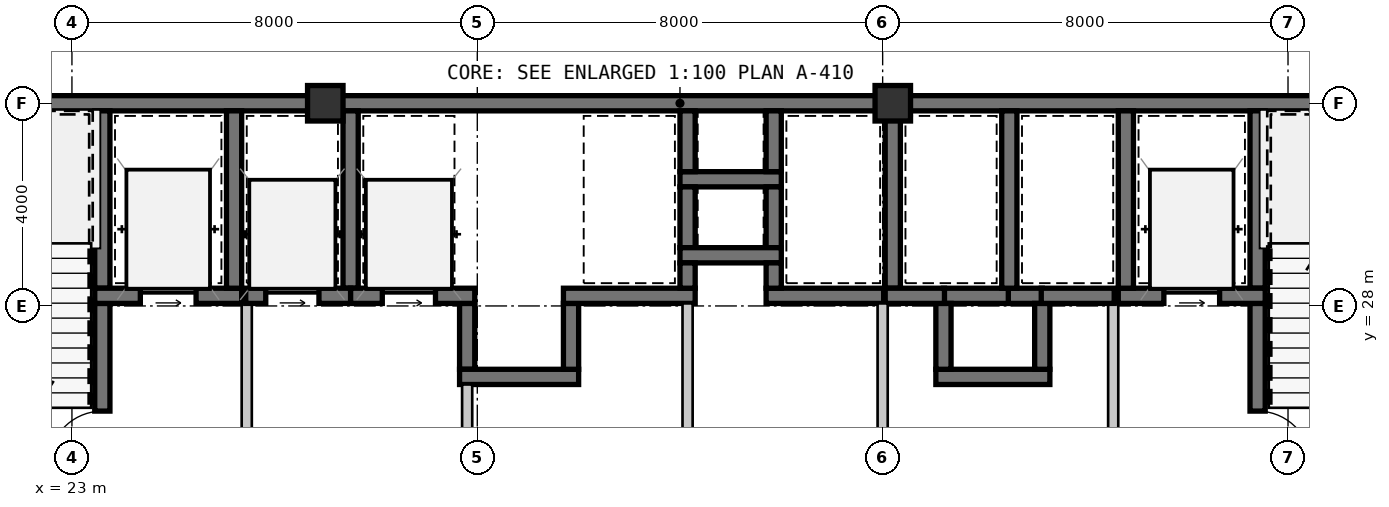
"""IFC4 building model, lengths in metres.
Left out: names, types, materials, properties, quantities, classifications, styles, units other than length and angle.
Written with IfcOpenShell. Run it as: python <this file> out.ifc"""

import sys

from ifc_helpers import new_model, si_unit, direction, frame, frame_2d, origin, origin_2d, place, context, subcontext, project, spatial, rectangle, extrude, source, transform, mapped, element, fill, save


model = new_model("IFC4")
c1 = context("Model", 3, precision=1e-05, world=origin(), true_north=direction((0.0, 1.0)))
c2 = subcontext(c1, "Body", "Model", "MODEL_VIEW")
j1 = project(units=[si_unit("LENGTHUNIT", "METRE"), si_unit("PLANEANGLEUNIT", "RADIAN")], contexts=[c1])
p1 = place(None, origin())
s1 = spatial("IfcSite", under=j1, at=p1, CompositionType="ELEMENT")
p2 = place(p1, origin())
s2 = spatial("IfcBuilding", under=s1, at=p2, CompositionType="ELEMENT")
p3 = place(p2, frame((0.0, 0.0, 74.55)))
s3 = spatial("IfcBuildingStorey", under=s2, at=p3, CompositionType="ELEMENT", Elevation=74.55)
m1 = source(origin(), c2, "Body", "SweptSolid", [
    extrude(rectangle(XDim=0.7, YDim=0.7, at=origin_2d()), origin(), (0.0, 0.0, 1.0), 3.15),
])
for number, where, z_axis, x_axis in (
    (1, (28.0, 32.0, 0.0), (0.0, 0.0, 1.0), (1.0, 0.0, 0.0)),
    (2, (39.2, 32.0, 0.0), (0.0, 0.0, 1.0), (1.0, 0.0, 0.0)),
):
    element("IfcColumn", number, at=place(p3, frame(where, z_axis=z_axis, x_axis=x_axis)), inside=s3, PredefinedType="COLUMN", context=c2, shape_type="MappedRepresentation", body=[
        mapped(m1, transform((0.0, 0.0, 0.0), scale=1.0)),
    ])
m2 = source(origin(), c2, "Body", "SweptSolid", [
    extrude(rectangle(XDim=9.15, YDim=0.3, at=frame_2d((4.575, 0.0))), origin(), (0.0, 0.0, 1.0), 2.93),
])
p4 = place(p3, frame((18.85, 32.0, 0.0), z_axis=(0.0, 0.0, 1.0), x_axis=(1.0, 0.0, 0.0)))
e3 = element("IfcWall", 3, at=p4, inside=s3, PredefinedType="SHEAR", context=c2, shape_type="MappedRepresentation", body=[
    mapped(m2, transform((0.0, 0.0, 0.0), scale=1.0)),
])
m3 = source(origin(), c2, "Body", "SweptSolid", [
    extrude(rectangle(XDim=11.2, YDim=0.3, at=frame_2d((5.6, 0.0))), origin(), (0.0, 0.0, 1.0), 2.93),
])
p5 = place(p3, frame((28.0, 32.0, 0.0), z_axis=(0.0, 0.0, 1.0), x_axis=(1.0, 0.0, 0.0)))
e4 = element("IfcWall", 4, at=p5, inside=s3, PredefinedType="SHEAR", context=c2, shape_type="MappedRepresentation", body=[
    mapped(m3, transform((0.0, 0.0, 0.0), scale=1.0)),
])
m4 = source(origin(), c2, "Body", "SweptSolid", [
    extrude(rectangle(XDim=11.95, YDim=0.3, at=frame_2d((5.975, 0.0))), origin(), (0.0, 0.0, 1.0), 2.93),
])
p6 = place(p3, frame((39.2, 32.0, 0.0), z_axis=(0.0, 0.0, 1.0), x_axis=(1.0, 0.0, 0.0)))
e5 = element("IfcWall", 5, at=p6, inside=s3, PredefinedType="SHEAR", context=c2, shape_type="MappedRepresentation", body=[
    mapped(m4, transform((0.0, 0.0, 0.0), scale=1.0)),
])
m5 = source(origin(), c2, "Body", "SweptSolid", [
    extrude(rectangle(XDim=3.5, YDim=0.3, at=frame_2d((1.75, 0.0))), origin(), (0.0, 0.0, 1.0), 2.93),
])
p7 = place(p3, frame((23.6, 28.35, 0.0), z_axis=(0.0, 0.0, 1.0), x_axis=(0.0, 1.0, 0.0)))
e6 = element("IfcWall", 6, at=p7, inside=s3, PredefinedType="SHEAR", context=c2, shape_type="MappedRepresentation", body=[
    mapped(m5, transform((0.0, 0.0, 0.0), scale=1.0)),
])
m6 = source(origin(), c2, "Body", "SweptSolid", [
    extrude(rectangle(XDim=3.9, YDim=0.3, at=frame_2d((1.95, 0.0))), origin(), (0.0, 0.0, 1.0), 2.93),
])
p8 = place(p3, frame((23.6, 24.15, 0.0), z_axis=(0.0, 0.0, 1.0), x_axis=(0.0, 1.0, 0.0)))
e7 = element("IfcWall", 7, at=p8, inside=s3, PredefinedType="SHEAR", context=c2, shape_type="MappedRepresentation", body=[
    mapped(m6, transform((0.0, 0.0, 0.0), scale=1.0)),
])
m7 = source(origin(), c2, "Body", "SweptSolid", [
    extrude(rectangle(XDim=1.05, YDim=2.1, at=frame_2d((0.525, 1.05))), frame((0.0, 0.16, 0.0), z_axis=(0.0, -1.0, 0.0), x_axis=(1.0, 0.0, 0.0)), (0.0, 0.0, 1.0), 0.32),
])
p9 = place(p8, frame((0.725, 0.0, 0.0)))
e8 = element("IfcOpeningElement", 8, at=p9, cuts=e7, PredefinedType="OPENING", context=c2, shape_type="MappedRepresentation", body=[
    mapped(m7, transform((0.0, 0.0, 0.0), scale=1.0)),
])
m8 = source(origin(), c2, "Body", "SweptSolid", [
    extrude(rectangle(XDim=2.9, YDim=0.3, at=frame_2d((1.45, 0.0))), origin(), (0.0, 0.0, 1.0), 2.93),
])
p10 = place(p3, frame((23.45, 28.2, 0.0), z_axis=(0.0, 0.0, 1.0), x_axis=(1.0, 0.0, 0.0)))
e9 = element("IfcWall", 9, at=p10, inside=s3, PredefinedType="SHEAR", context=c2, shape_type="MappedRepresentation", body=[
    mapped(m8, transform((0.0, 0.0, 0.0), scale=1.0)),
])
m9 = source(origin(), c2, "Body", "SweptSolid", [
    extrude(rectangle(XDim=1.1, YDim=2.15, at=frame_2d((0.55, 1.075))), frame((0.0, 0.16, 0.0), z_axis=(0.0, -1.0, 0.0), x_axis=(1.0, 0.0, 0.0)), (0.0, 0.0, 1.0), 0.32),
])
p11 = place(p10, frame((0.9, 0.0, 0.0)))
e10 = element("IfcOpeningElement", 10, at=p11, cuts=e9, PredefinedType="OPENING", context=c2, shape_type="MappedRepresentation", body=[
    mapped(m9, transform((0.0, 0.0, 0.0), scale=1.0)),
])
p12 = place(p3, frame((26.2, 28.35, 0.0), z_axis=(0.0, 0.0, 1.0), x_axis=(0.0, 1.0, 0.0)))
e11 = element("IfcWall", 11, at=p12, inside=s3, PredefinedType="SHEAR", context=c2, shape_type="MappedRepresentation", body=[
    mapped(m5, transform((0.0, 0.0, 0.0), scale=1.0)),
])
m10 = source(origin(), c2, "Body", "SweptSolid", [
    extrude(rectangle(XDim=3.95, YDim=0.2, at=frame_2d((1.975, 0.0))), origin(), (0.0, 0.0, 1.0), 2.93),
])
p13 = place(p3, frame((26.45, 24.1, 0.0), z_axis=(0.0, 0.0, 1.0), x_axis=(0.0, 1.0, 0.0)))
e12 = element("IfcWall", 12, at=p13, inside=s3, PredefinedType="SOLIDWALL", context=c2, shape_type="MappedRepresentation", body=[
    mapped(m10, transform((0.0, 0.0, 0.0), scale=1.0)),
])
p14 = place(p3, frame((46.4, 31.85, 0.0), z_axis=(0.0, 0.0, 1.0), x_axis=(0.0, -1.0, 0.0)))
e13 = element("IfcWall", 13, at=p14, inside=s3, PredefinedType="SHEAR", context=c2, shape_type="MappedRepresentation", body=[
    mapped(m5, transform((0.0, 0.0, 0.0), scale=1.0)),
])
p15 = place(p3, frame((46.4, 28.05, 0.0), z_axis=(0.0, 0.0, 1.0), x_axis=(0.0, -1.0, 0.0)))
e14 = element("IfcWall", 14, at=p15, inside=s3, PredefinedType="SHEAR", context=c2, shape_type="MappedRepresentation", body=[
    mapped(m6, transform((0.0, 0.0, 0.0), scale=1.0)),
])
p16 = place(p15, frame((2.125, 0.0, 0.0)))
e15 = element("IfcOpeningElement", 15, at=p16, cuts=e14, PredefinedType="OPENING", context=c2, shape_type="MappedRepresentation", body=[
    mapped(m7, transform((0.0, 0.0, 0.0), scale=1.0)),
])
p17 = place(p3, frame((43.65, 28.2, 0.0), z_axis=(0.0, 0.0, 1.0), x_axis=(1.0, 0.0, 0.0)))
e16 = element("IfcWall", 16, at=p17, inside=s3, PredefinedType="SHEAR", context=c2, shape_type="MappedRepresentation", body=[
    mapped(m8, transform((0.0, 0.0, 0.0), scale=1.0)),
])
p18 = place(p17, frame((0.9, 0.0, 0.0)))
e17 = element("IfcOpeningElement", 17, at=p18, cuts=e16, PredefinedType="OPENING", context=c2, shape_type="MappedRepresentation", body=[
    mapped(m9, transform((0.0, 0.0, 0.0), scale=1.0)),
])
p19 = place(p3, frame((43.8, 31.85, 0.0), z_axis=(0.0, 0.0, 1.0), x_axis=(0.0, -1.0, 0.0)))
e18 = element("IfcWall", 18, at=p19, inside=s3, PredefinedType="SHEAR", context=c2, shape_type="MappedRepresentation", body=[
    mapped(m5, transform((0.0, 0.0, 0.0), scale=1.0)),
])
p20 = place(p3, frame((43.55, 28.05, 0.0), z_axis=(0.0, 0.0, 1.0), x_axis=(0.0, -1.0, 0.0)))
e19 = element("IfcWall", 19, at=p20, inside=s3, PredefinedType="SOLIDWALL", context=c2, shape_type="MappedRepresentation", body=[
    mapped(m10, transform((0.0, 0.0, 0.0), scale=1.0)),
])
m11 = source(origin(), c2, "Body", "SweptSolid", [
    extrude(rectangle(XDim=2.0, YDim=0.3, at=frame_2d((1.0, 0.0))), origin(), (0.0, 0.0, 1.0), 2.93),
])
p21 = place(p3, frame((35.0, 30.5, 0.0), z_axis=(0.0, 0.0, 1.0), x_axis=(1.0, 0.0, 0.0)))
e20 = element("IfcWall", 20, at=p21, inside=s3, PredefinedType="SHEAR", context=c2, shape_type="MappedRepresentation", body=[
    mapped(m11, transform((0.0, 0.0, 0.0), scale=1.0)),
])
m12 = source(origin(), c2, "Body", "SweptSolid", [
    extrude(rectangle(XDim=1.2, YDim=0.3, at=frame_2d((0.6, 0.0))), origin(), (0.0, 0.0, 1.0), 2.93),
])
for number, where, z_axis, x_axis in (
    (21, (35.15, 31.85, 0.0), (0.0, 0.0, 1.0), (0.0, -1.0, 0.0)),
    (22, (36.85, 30.65, 0.0), (0.0, 0.0, 1.0), (0.0, 1.0, 0.0)),
    (23, (35.15, 30.35, 0.0), (0.0, 0.0, 1.0), (0.0, -1.0, 0.0)),
    (24, (36.85, 29.15, 0.0), (0.0, 0.0, 1.0), (0.0, 1.0, 0.0)),
):
    element("IfcWall", number, at=place(p3, frame(where, z_axis=z_axis, x_axis=x_axis)), inside=s3, PredefinedType="SHEAR", context=c2, shape_type="MappedRepresentation", body=[
        mapped(m12, transform((0.0, 0.0, 0.0), scale=1.0)),
    ])
p22 = place(p3, frame((35.0, 29.0, 0.0), z_axis=(0.0, 0.0, 1.0), x_axis=(1.0, 0.0, 0.0)))
e25 = element("IfcWall", 25, at=p22, inside=s3, PredefinedType="SHEAR", context=c2, shape_type="MappedRepresentation", body=[
    mapped(m11, transform((0.0, 0.0, 0.0), scale=1.0)),
])
m13 = source(origin(), c2, "Body", "SweptSolid", [
    extrude(rectangle(XDim=1.3, YDim=0.3, at=frame_2d((0.65, 0.0))), origin(), (0.0, 0.0, 1.0), 2.93),
])
p23 = place(p3, frame((30.8, 28.05, 0.0), z_axis=(0.0, 0.0, 1.0), x_axis=(0.0, -1.0, 0.0)))
e26 = element("IfcWall", 26, at=p23, inside=s3, PredefinedType="SHEAR", context=c2, shape_type="MappedRepresentation", body=[
    mapped(m13, transform((0.0, 0.0, 0.0), scale=1.0)),
])
m14 = source(origin(), c2, "Body", "SweptSolid", [
    extrude(rectangle(XDim=2.35, YDim=0.3, at=frame_2d((1.175, 0.0))), origin(), (0.0, 0.0, 1.0), 2.93),
])
p24 = place(p3, frame((30.65, 26.6, 0.0), z_axis=(0.0, 0.0, 1.0), x_axis=(1.0, 0.0, 0.0)))
e27 = element("IfcWall", 27, at=p24, inside=s3, PredefinedType="SHEAR", context=c2, shape_type="MappedRepresentation", body=[
    mapped(m14, transform((0.0, 0.0, 0.0), scale=1.0)),
])
p25 = place(p3, frame((32.85, 26.75, 0.0), z_axis=(0.0, 0.0, 1.0), x_axis=(0.0, 1.0, 0.0)))
e28 = element("IfcWall", 28, at=p25, inside=s3, PredefinedType="SHEAR", context=c2, shape_type="MappedRepresentation", body=[
    mapped(m13, transform((0.0, 0.0, 0.0), scale=1.0)),
])
m15 = source(origin(), c2, "Body", "SweptSolid", [
    extrude(rectangle(XDim=1.32, YDim=0.3, at=frame_2d((0.66, 0.0))), origin(), (0.0, 0.0, 1.0), 2.93),
])
p26 = place(p3, frame((41.52, 28.2, 0.0), z_axis=(0.0, 0.0, 1.0), x_axis=(-1.0, 0.0, 0.0)))
e29 = element("IfcWall", 29, at=p26, inside=s3, PredefinedType="SHEAR", context=c2, shape_type="MappedRepresentation", body=[
    mapped(m15, transform((0.0, 0.0, 0.0), scale=1.0)),
])
m16 = source(origin(), c2, "Body", "SweptSolid", [
    extrude(rectangle(XDim=0.67, YDim=0.3, at=frame_2d((0.335, 0.0))), origin(), (0.0, 0.0, 1.0), 2.93),
])
p27 = place(p3, frame((42.15, 28.2, 0.0), z_axis=(0.0, 0.0, 1.0), x_axis=(-1.0, 0.0, 0.0)))
e30 = element("IfcWall", 30, at=p27, inside=s3, PredefinedType="SHEAR", context=c2, shape_type="MappedRepresentation", body=[
    mapped(m16, transform((0.0, 0.0, 0.0), scale=1.0)),
])
m17 = source(origin(), c2, "Body", "SweptSolid", [
    extrude(rectangle(XDim=2.25, YDim=0.3, at=frame_2d((1.125, 0.0))), origin(), (0.0, 0.0, 1.0), 2.93),
])
p28 = place(p3, frame((40.05, 26.6, 0.0), z_axis=(0.0, 0.0, 1.0), x_axis=(1.0, 0.0, 0.0)))
e31 = element("IfcWall", 31, at=p28, inside=s3, PredefinedType="SHEAR", context=c2, shape_type="MappedRepresentation", body=[
    mapped(m17, transform((0.0, 0.0, 0.0), scale=1.0)),
])
for number, where, z_axis, x_axis in (
    (32, (40.2, 28.05, 0.0), (0.0, 0.0, 1.0), (0.0, -1.0, 0.0)),
    (33, (42.15, 26.75, 0.0), (0.0, 0.0, 1.0), (0.0, 1.0, 0.0)),
):
    element("IfcWall", number, at=place(p3, frame(where, z_axis=z_axis, x_axis=x_axis)), inside=s3, PredefinedType="SHEAR", context=c2, shape_type="MappedRepresentation", body=[
        mapped(m13, transform((0.0, 0.0, 0.0), scale=1.0)),
    ])
p29 = place(p3, frame((28.5, 28.35, 0.0), z_axis=(0.0, 0.0, 1.0), x_axis=(0.0, 1.0, 0.0)))
e34 = element("IfcWall", 34, at=p29, inside=s3, PredefinedType="SHEAR", context=c2, shape_type="MappedRepresentation", body=[
    mapped(m5, transform((0.0, 0.0, 0.0), scale=1.0)),
])
m18 = source(origin(), c2, "Body", "SweptSolid", [
    extrude(rectangle(XDim=2.07, YDim=0.3, at=frame_2d((1.035, 0.0))), origin(), (0.0, 0.0, 1.0), 2.93),
])
p30 = place(p3, frame((26.43, 28.2, 0.0), z_axis=(0.0, 0.0, 1.0), x_axis=(1.0, 0.0, 0.0)))
e35 = element("IfcWall", 35, at=p30, inside=s3, PredefinedType="SHEAR", context=c2, shape_type="MappedRepresentation", body=[
    mapped(m18, transform((0.0, 0.0, 0.0), scale=1.0)),
])
m19 = source(origin(), c2, "Body", "SweptSolid", [
    extrude(rectangle(XDim=1.05, YDim=2.15, at=frame_2d((0.525, 1.075))), frame((0.0, 0.16, 0.0), z_axis=(0.0, -1.0, 0.0), x_axis=(1.0, 0.0, 0.0)), (0.0, 0.0, 1.0), 0.32),
])
p31 = place(p30, frame((0.395, 0.0, 0.0)))
e36 = element("IfcOpeningElement", 36, at=p31, cuts=e35, PredefinedType="OPENING", context=c2, shape_type="MappedRepresentation", body=[
    mapped(m19, transform((0.0, 0.0, 0.0), scale=1.0)),
])
m20 = source(origin(), c2, "Body", "SweptSolid", [
    extrude(rectangle(XDim=2.45, YDim=0.3, at=frame_2d((1.225, 0.0))), origin(), (0.0, 0.0, 1.0), 2.93),
])
p32 = place(p3, frame((28.5, 28.2, 0.0), z_axis=(0.0, 0.0, 1.0), x_axis=(1.0, 0.0, 0.0)))
e37 = element("IfcWall", 37, at=p32, inside=s3, PredefinedType="SHEAR", context=c2, shape_type="MappedRepresentation", body=[
    mapped(m20, transform((0.0, 0.0, 0.0), scale=1.0)),
])
p33 = place(p32, frame((0.625, 0.0, 0.0)))
e38 = element("IfcOpeningElement", 38, at=p33, cuts=e37, PredefinedType="OPENING", context=c2, shape_type="MappedRepresentation", body=[
    mapped(m19, transform((0.0, 0.0, 0.0), scale=1.0)),
])
m21 = source(origin(), c2, "Body", "SweptSolid", [
    extrude(rectangle(XDim=2.35, YDim=0.2, at=frame_2d((1.175, 0.0))), origin(), (0.0, 0.0, 1.0), 2.93),
])
p34 = place(p3, frame((30.8, 26.45, 0.0), z_axis=(0.0, 0.0, 1.0), x_axis=(0.0, -1.0, 0.0)))
e39 = element("IfcWall", 39, at=p34, inside=s3, PredefinedType="SOLIDWALL", context=c2, shape_type="MappedRepresentation", body=[
    mapped(m21, transform((0.0, 0.0, 0.0), scale=1.0)),
])
m22 = source(origin(), c2, "Body", "SweptSolid", [
    extrude(rectangle(XDim=2.6, YDim=0.3, at=frame_2d((1.3, 0.0))), origin(), (0.0, 0.0, 1.0), 2.93),
])
p35 = place(p3, frame((32.7, 28.2, 0.0), z_axis=(0.0, 0.0, 1.0), x_axis=(1.0, 0.0, 0.0)))
e40 = element("IfcWall", 40, at=p35, inside=s3, PredefinedType="SHEAR", context=c2, shape_type="MappedRepresentation", body=[
    mapped(m22, transform((0.0, 0.0, 0.0), scale=1.0)),
])
m23 = source(origin(), c2, "Body", "SweptSolid", [
    extrude(rectangle(XDim=0.5, YDim=0.3, at=frame_2d((0.25, 0.0))), origin(), (0.0, 0.0, 1.0), 2.93),
])
p36 = place(p3, frame((35.15, 28.35, 0.0), z_axis=(0.0, 0.0, 1.0), x_axis=(0.0, 1.0, 0.0)))
e41 = element("IfcWall", 41, at=p36, inside=s3, PredefinedType="SHEAR", context=c2, shape_type="MappedRepresentation", body=[
    mapped(m23, transform((0.0, 0.0, 0.0), scale=1.0)),
])
p37 = place(p3, frame((39.2, 28.35, 0.0), z_axis=(0.0, 0.0, 1.0), x_axis=(0.0, 1.0, 0.0)))
e42 = element("IfcWall", 42, at=p37, inside=s3, PredefinedType="SHEAR", context=c2, shape_type="MappedRepresentation", body=[
    mapped(m5, transform((0.0, 0.0, 0.0), scale=1.0)),
])
m24 = source(origin(), c2, "Body", "SweptSolid", [
    extrude(rectangle(XDim=2.32, YDim=0.3, at=frame_2d((1.16, 0.0))), origin(), (0.0, 0.0, 1.0), 2.93),
])
p38 = place(p3, frame((36.7, 28.2, 0.0), z_axis=(0.0, 0.0, 1.0), x_axis=(1.0, 0.0, 0.0)))
e43 = element("IfcWall", 43, at=p38, inside=s3, PredefinedType="SHEAR", context=c2, shape_type="MappedRepresentation", body=[
    mapped(m24, transform((0.0, 0.0, 0.0), scale=1.0)),
])
p39 = place(p3, frame((36.85, 28.85, 0.0), z_axis=(0.0, 0.0, 1.0), x_axis=(0.0, -1.0, 0.0)))
e44 = element("IfcWall", 44, at=p39, inside=s3, PredefinedType="SHEAR", context=c2, shape_type="MappedRepresentation", body=[
    mapped(m23, transform((0.0, 0.0, 0.0), scale=1.0)),
])
p40 = place(p3, frame((41.5, 28.35, 0.0), z_axis=(0.0, 0.0, 1.0), x_axis=(0.0, 1.0, 0.0)))
e45 = element("IfcWall", 45, at=p40, inside=s3, PredefinedType="SHEAR", context=c2, shape_type="MappedRepresentation", body=[
    mapped(m5, transform((0.0, 0.0, 0.0), scale=1.0)),
])
m25 = source(origin(), c2, "Body", "SweptSolid", [
    extrude(rectangle(XDim=1.17, YDim=0.3, at=frame_2d((0.585, 0.0))), origin(), (0.0, 0.0, 1.0), 2.93),
])
p41 = place(p3, frame((39.05, 28.2, 0.0), z_axis=(0.0, 0.0, 1.0), x_axis=(1.0, 0.0, 0.0)))
e46 = element("IfcWall", 46, at=p41, inside=s3, PredefinedType="SHEAR", context=c2, shape_type="MappedRepresentation", body=[
    mapped(m25, transform((0.0, 0.0, 0.0), scale=1.0)),
])
m26 = source(origin(), c2, "Body", "SweptSolid", [
    extrude(rectangle(XDim=1.44, YDim=0.3, at=frame_2d((0.72, 0.0))), origin(), (0.0, 0.0, 1.0), 2.93),
])
p42 = place(p3, frame((42.13, 28.2, 0.0), z_axis=(0.0, 0.0, 1.0), x_axis=(1.0, 0.0, 0.0)))
e47 = element("IfcWall", 47, at=p42, inside=s3, PredefinedType="SHEAR", context=c2, shape_type="MappedRepresentation", body=[
    mapped(m26, transform((0.0, 0.0, 0.0), scale=1.0)),
])
for number, where, z_axis, x_axis in (
    (48, (35.15, 28.05, 0.0), (0.0, 0.0, 1.0), (0.0, -1.0, 0.0)),
    (49, (39.0, 28.05, 0.0), (0.0, 0.0, 1.0), (0.0, -1.0, 0.0)),
):
    element("IfcWall", number, at=place(p3, frame(where, z_axis=z_axis, x_axis=x_axis)), inside=s3, PredefinedType="SOLIDWALL", context=c2, shape_type="MappedRepresentation", body=[
        mapped(m10, transform((0.0, 0.0, 0.0), scale=1.0)),
    ])
m27 = source(origin(), c2, "Body", "SweptSolid", [
    extrude(rectangle(XDim=1.05, YDim=2.1, at=frame_2d((0.525, 1.05))), frame((0.0, 0.025, 0.0), z_axis=(0.0, -1.0, 0.0), x_axis=(1.0, 0.0, 0.0)), (0.0, 0.0, 1.0), 0.05),
])
p43 = place(p9, origin())
e50 = element("IfcDoor", 50, at=p43, inside=s3, OperationType="SINGLE_SWING_LEFT", PredefinedType="DOOR", context=c2, shape_type="MappedRepresentation", body=[
    mapped(m27, transform((0.0, 0.0, 0.0), scale=1.0)),
])
fill(e8, e50)
m28 = source(origin(), c2, "Body", "SweptSolid", [
    extrude(rectangle(XDim=1.1, YDim=2.15, at=frame_2d((0.55, 1.075))), frame((0.0, 0.025, 0.0), z_axis=(0.0, -1.0, 0.0), x_axis=(1.0, 0.0, 0.0)), (0.0, 0.0, 1.0), 0.05),
])
p44 = place(p11, origin())
e51 = element("IfcDoor", 51, at=p44, inside=s3, OperationType="SLIDING_TO_LEFT", PredefinedType="DOOR", context=c2, shape_type="MappedRepresentation", body=[
    mapped(m28, transform((0.0, 0.0, 0.0), scale=1.0)),
])
fill(e10, e51)
p45 = place(p16, origin())
e52 = element("IfcDoor", 52, at=p45, inside=s3, OperationType="SINGLE_SWING_RIGHT", PredefinedType="DOOR", context=c2, shape_type="MappedRepresentation", body=[
    mapped(m27, transform((0.0, 0.0, 0.0), scale=1.0)),
])
fill(e15, e52)
p46 = place(p18, origin())
e53 = element("IfcDoor", 53, at=p46, inside=s3, OperationType="SLIDING_TO_LEFT", PredefinedType="DOOR", context=c2, shape_type="MappedRepresentation", body=[
    mapped(m28, transform((0.0, 0.0, 0.0), scale=1.0)),
])
fill(e17, e53)
m29 = source(origin(), c2, "Body", "SweptSolid", [
    extrude(rectangle(XDim=1.05, YDim=2.15, at=frame_2d((0.525, 1.075))), frame((0.0, 0.025, 0.0), z_axis=(0.0, -1.0, 0.0), x_axis=(1.0, 0.0, 0.0)), (0.0, 0.0, 1.0), 0.05),
])
p47 = place(p31, origin())
e54 = element("IfcDoor", 54, at=p47, inside=s3, OperationType="SLIDING_TO_LEFT", PredefinedType="DOOR", context=c2, shape_type="MappedRepresentation", body=[
    mapped(m29, transform((0.0, 0.0, 0.0), scale=1.0)),
])
fill(e36, e54)
p48 = place(p33, origin())
e55 = element("IfcDoor", 55, at=p48, inside=s3, OperationType="SLIDING_TO_LEFT", PredefinedType="DOOR", context=c2, shape_type="MappedRepresentation", body=[
    mapped(m29, transform((0.0, 0.0, 0.0), scale=1.0)),
])
fill(e38, e55)
save(model, sys.argv[1])
